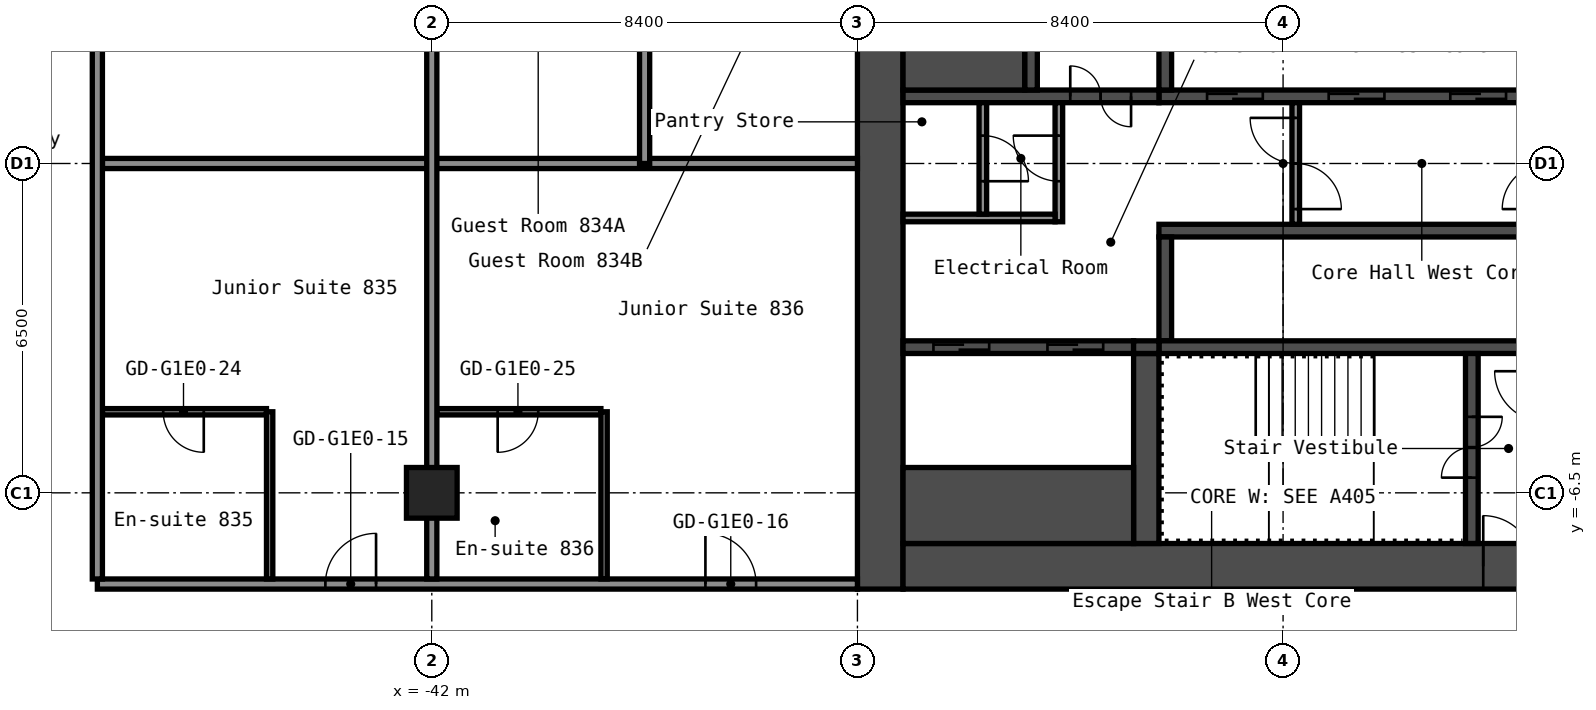
"""IFC4 building model, lengths in metres.
Left out: names, types, materials, properties, quantities, classifications, styles, units other than length and angle.
Written with IfcOpenShell. Run it as: python <this file> out.ifc"""

import sys

from ifc_helpers import new_model, si_unit, direction, frame, frame_2d, origin, origin_2d, place, context, subcontext, project, spatial, rectangle, hollow_rectangle, extrude, element, fill, save


model = new_model("IFC4")
c1 = context("Model", 3, precision=1e-05, world=origin(), true_north=direction((0.0, 1.0)))
c2 = subcontext(c1, "Body", "Model", "MODEL_VIEW")
j1 = project(units=[si_unit("LENGTHUNIT", "METRE"), si_unit("PLANEANGLEUNIT", "RADIAN")], contexts=[c1])
p1 = place(None, origin())
s1 = spatial("IfcSite", under=j1, at=p1, CompositionType="ELEMENT")
p2 = place(p1, origin())
s2 = spatial("IfcBuilding", under=s1, at=p2, CompositionType="ELEMENT")
p3 = place(p2, frame((0.0, 0.0, 32.6)))
s3 = spatial("IfcBuildingStorey", under=s2, at=p3, CompositionType="ELEMENT", Elevation=32.6)
p4 = place(p3, frame((-42.0, -6.5, 0.0), z_axis=(0.0, 0.0, 1.0), x_axis=(1.0, 0.0, 0.0)))
e1 = element("IfcColumn", 1, at=p4, inside=s3, PredefinedType="COLUMN", context=c2, shape_type="SweptSolid", body=[
    extrude(hollow_rectangle(XDim=1.0, YDim=1.0, WallThickness=0.04, at=origin_2d()), origin(), (0.0, 0.0, 1.0), 2.8),
])
p5 = place(p3, frame((-33.15, -8.4, 0.0), z_axis=(0.0, 0.0, 1.0), x_axis=(0.0, 1.0, 0.0)))
e2 = element("IfcWall", 2, at=p5, inside=s3, PredefinedType="SHEAR", context=c2, shape_type="SweptSolid", body=[
    extrude(rectangle(XDim=16.8, YDim=0.9, at=frame_2d((8.4, 0.0))), origin(), (0.0, 0.0, 1.0), 2.8),
])
p6 = place(p3, frame((-32.7, -7.95, 0.0), z_axis=(0.0, 0.0, 1.0), x_axis=(1.0, 0.0, 0.0)))
e3 = element("IfcWall", 3, at=p6, inside=s3, PredefinedType="SHEAR", context=c2, shape_type="SweptSolid", body=[
    extrude(rectangle(XDim=15.0, YDim=0.9, at=frame_2d((7.5, 0.0))), origin(), (0.0, 0.0, 1.0), 2.8),
])
p7 = place(p6, frame((11.45, 0.0, 0.0)))
e4 = element("IfcOpeningElement", 4, at=p7, cuts=e3, PredefinedType="OPENING", context=c2, shape_type="SweptSolid", body=[
    extrude(rectangle(XDim=1.0, YDim=2.1, at=frame_2d((0.5, 1.05))), frame((0.0, 0.46, 0.0), z_axis=(0.0, -1.0, 0.0), x_axis=(1.0, 0.0, 0.0)), (0.0, 0.0, 1.0), 0.92),
])
p8 = place(p3, frame((-27.65, 1.325, 0.0), z_axis=(0.0, 0.0, 1.0), x_axis=(1.0, 0.0, 0.0)))
e5 = element("IfcWall", 5, at=p8, inside=s3, PredefinedType="SHEAR", context=c2, shape_type="SweptSolid", body=[
    extrude(rectangle(XDim=7.5, YDim=0.25, at=frame_2d((3.75, 0.0))), origin(), (0.0, 0.0, 1.0), 2.8),
])
p9 = place(p8, frame((5.75, 0.0, 0.0)))
e6 = element("IfcOpeningElement", 6, at=p9, cuts=e5, PredefinedType="OPENING", context=c2, shape_type="SweptSolid", body=[
    extrude(rectangle(XDim=1.1, YDim=2.1, at=frame_2d((0.55, 1.05))), frame((0.0, 0.135, 0.0), z_axis=(0.0, -1.0, 0.0), x_axis=(1.0, 0.0, 0.0)), (0.0, 0.0, 1.0), 0.27),
])
p10 = place(p8, frame((3.35, 0.0, 0.0)))
e7 = element("IfcOpeningElement", 7, at=p10, cuts=e5, PredefinedType="OPENING", context=c2, shape_type="SweptSolid", body=[
    extrude(rectangle(XDim=1.1, YDim=2.1, at=frame_2d((0.55, 1.05))), frame((0.0, 0.135, 0.0), z_axis=(0.0, -1.0, 0.0), x_axis=(1.0, 0.0, 0.0)), (0.0, 0.0, 1.0), 0.27),
])
p11 = place(p8, frame((0.95, 0.0, 0.0)))
e8 = element("IfcOpeningElement", 8, at=p11, cuts=e5, PredefinedType="OPENING", context=c2, shape_type="SweptSolid", body=[
    extrude(rectangle(XDim=1.1, YDim=2.1, at=frame_2d((0.55, 1.05))), frame((0.0, 0.135, 0.0), z_axis=(0.0, -1.0, 0.0), x_axis=(1.0, 0.0, 0.0)), (0.0, 0.0, 1.0), 0.27),
])
p12 = place(p3, frame((-27.525, 1.45, 0.0), z_axis=(0.0, 0.0, 1.0), x_axis=(0.0, 1.0, 0.0)))
e9 = element("IfcWall", 9, at=p12, inside=s3, PredefinedType="SHEAR", context=c2, shape_type="SweptSolid", body=[
    extrude(rectangle(XDim=2.05, YDim=0.25, at=frame_2d((1.025, 0.0))), origin(), (0.0, 0.0, 1.0), 2.8),
])
p13 = place(p3, frame((-32.7, 1.325, 0.0), z_axis=(0.0, 0.0, 1.0), x_axis=(1.0, 0.0, 0.0)))
e10 = element("IfcWall", 10, at=p13, inside=s3, PredefinedType="SHEAR", context=c2, shape_type="SweptSolid", body=[
    extrude(rectangle(XDim=5.05, YDim=0.25, at=frame_2d((2.525, 0.0))), origin(), (0.0, 0.0, 1.0), 2.8),
])
p14 = place(p13, frame((3.3, 0.0, 0.0)))
e11 = element("IfcOpeningElement", 11, at=p14, cuts=e10, PredefinedType="OPENING", context=c2, shape_type="SweptSolid", body=[
    extrude(rectangle(XDim=1.2, YDim=2.1, at=frame_2d((0.6, 1.05))), frame((0.0, 0.135, 0.0), z_axis=(0.0, -1.0, 0.0), x_axis=(1.0, 0.0, 0.0)), (0.0, 0.0, 1.0), 0.27),
])
p15 = place(p3, frame((-30.175, 1.45, 0.0), z_axis=(0.0, 0.0, 1.0), x_axis=(0.0, 1.0, 0.0)))
e12 = element("IfcWall", 12, at=p15, inside=s3, PredefinedType="SHEAR", context=c2, shape_type="SweptSolid", body=[
    extrude(rectangle(XDim=6.05, YDim=0.25, at=frame_2d((3.025, 0.0))), origin(), (0.0, 0.0, 1.0), 2.8),
])
p16 = place(p15, frame((2.625, 0.0, 0.0)))
e13 = element("IfcOpeningElement", 13, at=p16, cuts=e12, PredefinedType="OPENING", context=c2, shape_type="SweptSolid", body=[
    extrude(rectangle(XDim=1.1, YDim=2.1, at=frame_2d((0.55, 1.05))), frame((0.0, 0.135, 0.0), z_axis=(0.0, -1.0, 0.0), x_axis=(1.0, 0.0, 0.0)), (0.0, 0.0, 1.0), 0.27),
])
p17 = place(p3, frame((-32.7, 2.375, 0.0), z_axis=(0.0, 0.0, 1.0), x_axis=(1.0, 0.0, 0.0)))
e14 = element("IfcWall", 14, at=p17, inside=s3, PredefinedType="SHEAR", context=c2, shape_type="SweptSolid", body=[
    extrude(rectangle(XDim=2.4, YDim=1.85, at=frame_2d((1.2, 0.0))), origin(), (0.0, 0.0, 1.0), 2.8),
])
p18 = place(p3, frame((-27.65, -1.325, 0.0), z_axis=(0.0, 0.0, 1.0), x_axis=(1.0, 0.0, 0.0)))
e15 = element("IfcWall", 15, at=p18, inside=s3, PredefinedType="SHEAR", context=c2, shape_type="SweptSolid", body=[
    extrude(rectangle(XDim=7.5, YDim=0.25, at=frame_2d((3.75, 0.0))), origin(), (0.0, 0.0, 1.0), 2.8),
])
p19 = place(p3, frame((-27.525, -3.5, 0.0), z_axis=(0.0, 0.0, 1.0), x_axis=(0.0, 1.0, 0.0)))
e16 = element("IfcWall", 16, at=p19, inside=s3, PredefinedType="SHEAR", context=c2, shape_type="SweptSolid", body=[
    extrude(rectangle(XDim=2.05, YDim=0.25, at=frame_2d((1.025, 0.0))), origin(), (0.0, 0.0, 1.0), 2.8),
])
p20 = place(p3, frame((-27.65, -3.625, 0.0), z_axis=(0.0, 0.0, 1.0), x_axis=(1.0, 0.0, 0.0)))
e17 = element("IfcWall", 17, at=p20, inside=s3, PredefinedType="SHEAR", context=c2, shape_type="SweptSolid", body=[
    extrude(rectangle(XDim=7.5, YDim=0.25, at=frame_2d((3.75, 0.0))), origin(), (0.0, 0.0, 1.0), 2.8),
])
p21 = place(p3, frame((-21.475, -7.5, 0.0), z_axis=(0.0, 0.0, 1.0), x_axis=(0.0, 1.0, 0.0)))
e18 = element("IfcWall", 18, at=p21, inside=s3, PredefinedType="SHEAR", context=c2, shape_type="SweptSolid", body=[
    extrude(rectangle(XDim=3.75, YDim=0.25, at=frame_2d((1.875, 0.0))), origin(), (0.0, 0.0, 1.0), 2.8),
])
p22 = place(p21, frame((1.3, 0.0, 0.0)))
e19 = element("IfcOpeningElement", 19, at=p22, cuts=e18, PredefinedType="OPENING", context=c2, shape_type="SweptSolid", body=[
    extrude(rectangle(XDim=1.2, YDim=2.1, at=frame_2d((0.6, 1.05))), frame((0.0, 0.135, 0.0), z_axis=(0.0, -1.0, 0.0), x_axis=(1.0, 0.0, 0.0)), (0.0, 0.0, 1.0), 0.27),
])
p23 = place(p3, frame((-27.9, -7.5, 0.0), z_axis=(0.0, 0.0, 1.0), x_axis=(0.0, 1.0, 0.0)))
e20 = element("IfcWall", 20, at=p23, inside=s3, PredefinedType="SHEAR", context=c2, shape_type="SweptSolid", body=[
    extrude(rectangle(XDim=3.75, YDim=0.5, at=frame_2d((1.875, 0.0))), origin(), (0.0, 0.0, 1.0), 2.8),
])
p24 = place(p3, frame((-32.7, -3.625, 0.0), z_axis=(0.0, 0.0, 1.0), x_axis=(1.0, 0.0, 0.0)))
e21 = element("IfcWall", 21, at=p24, inside=s3, PredefinedType="SHEAR", context=c2, shape_type="SweptSolid", body=[
    extrude(rectangle(XDim=4.55, YDim=0.25, at=frame_2d((2.275, 0.0))), origin(), (0.0, 0.0, 1.0), 2.8),
])
p25 = place(p24, frame((2.85, 0.0, 0.0)))
e22 = element("IfcOpeningElement", 22, at=p25, cuts=e21, PredefinedType="OPENING", context=c2, shape_type="SweptSolid", body=[
    extrude(rectangle(XDim=1.1, YDim=2.1, at=frame_2d((0.55, 1.05))), frame((0.0, 0.135, 0.0), z_axis=(0.0, -1.0, 0.0), x_axis=(1.0, 0.0, 0.0)), (0.0, 0.0, 1.0), 0.27),
])
p26 = place(p24, frame((0.6, 0.0, 0.0)))
e23 = element("IfcOpeningElement", 23, at=p26, cuts=e21, PredefinedType="OPENING", context=c2, shape_type="SweptSolid", body=[
    extrude(rectangle(XDim=1.1, YDim=2.1, at=frame_2d((0.55, 1.05))), frame((0.0, 0.135, 0.0), z_axis=(0.0, -1.0, 0.0), x_axis=(1.0, 0.0, 0.0)), (0.0, 0.0, 1.0), 0.27),
])
p27 = place(p3, frame((-32.7, -6.75, 0.0), z_axis=(0.0, 0.0, 1.0), x_axis=(1.0, 0.0, 0.0)))
e24 = element("IfcWall", 24, at=p27, inside=s3, PredefinedType="SHEAR", context=c2, shape_type="SweptSolid", body=[
    extrude(rectangle(XDim=4.55, YDim=1.5, at=frame_2d((2.275, 0.0))), origin(), (0.0, 0.0, 1.0), 2.8),
])
p28 = place(p3, frame((-28.15, -3.625, 0.0), z_axis=(0.0, 0.0, 1.0), x_axis=(1.0, 0.0, 0.0)))
e25 = element("IfcWall", 25, at=p28, inside=s3, PredefinedType="SHEAR", context=c2, shape_type="SweptSolid", body=[
    extrude(rectangle(XDim=0.5, YDim=0.25, at=frame_2d((0.25, 0.0))), origin(), (0.0, 0.0, 1.0), 2.8),
])
p29 = place(p3, frame((-24.95, -1.2, 0.0), z_axis=(0.0, 0.0, 1.0), x_axis=(0.0, 1.0, 0.0)))
e26 = element("IfcWall", 26, at=p29, inside=s3, PredefinedType="PARTITIONING", context=c2, shape_type="SweptSolid", body=[
    extrude(rectangle(XDim=2.4, YDim=0.15, at=frame_2d((1.2, 0.0))), origin(), (0.0, 0.0, 1.0), 2.8),
])
p30 = place(p29, frame((0.3, 0.0, 0.0)))
e27 = element("IfcOpeningElement", 27, at=p30, cuts=e26, PredefinedType="OPENING", context=c2, shape_type="SweptSolid", body=[
    extrude(rectangle(XDim=1.8, YDim=2.1, at=frame_2d((0.9, 1.05))), frame((0.0, 0.085, 0.0), z_axis=(0.0, -1.0, 0.0), x_axis=(1.0, 0.0, 0.0)), (0.0, 0.0, 1.0), 0.17),
])
p31 = place(p3, frame((-29.625, -1.15, 0.0), z_axis=(0.0, 0.0, 1.0), x_axis=(0.0, 1.0, 0.0)))
e28 = element("IfcWall", 28, at=p31, inside=s3, PredefinedType="PARTITIONING", context=c2, shape_type="SweptSolid", body=[
    extrude(rectangle(XDim=2.35, YDim=0.15, at=frame_2d((1.175, 0.0))), origin(), (0.0, 0.0, 1.0), 2.8),
])
p32 = place(p31, frame((0.8, 0.0, 0.0)))
e29 = element("IfcOpeningElement", 29, at=p32, cuts=e28, PredefinedType="OPENING", context=c2, shape_type="SweptSolid", body=[
    extrude(rectangle(XDim=0.9, YDim=2.1, at=frame_2d((0.45, 1.05))), frame((0.0, 0.085, 0.0), z_axis=(0.0, -1.0, 0.0), x_axis=(1.0, 0.0, 0.0)), (0.0, 0.0, 1.0), 0.17),
])
p33 = place(p3, frame((-32.7, -1.075, 0.0), z_axis=(0.0, 0.0, 1.0), x_axis=(1.0, 0.0, 0.0)))
e30 = element("IfcWall", 30, at=p33, inside=s3, PredefinedType="PARTITIONING", context=c2, shape_type="SweptSolid", body=[
    extrude(rectangle(XDim=3.0, YDim=0.15, at=frame_2d((1.5, 0.0))), origin(), (0.0, 0.0, 1.0), 2.8),
])
p34 = place(p3, frame((-31.125, -1.0, 0.0), z_axis=(0.0, 0.0, 1.0), x_axis=(0.0, 1.0, 0.0)))
e31 = element("IfcWall", 31, at=p34, inside=s3, PredefinedType="PARTITIONING", context=c2, shape_type="SweptSolid", body=[
    extrude(rectangle(XDim=2.2, YDim=0.15, at=frame_2d((1.1, 0.0))), origin(), (0.0, 0.0, 1.0), 2.8),
])
p35 = place(p34, frame((0.65, 0.0, 0.0)))
e32 = element("IfcOpeningElement", 32, at=p35, cuts=e31, PredefinedType="OPENING", context=c2, shape_type="SweptSolid", body=[
    extrude(rectangle(XDim=0.9, YDim=2.1, at=frame_2d((0.45, 1.05))), frame((0.0, 0.085, 0.0), z_axis=(0.0, -1.0, 0.0), x_axis=(1.0, 0.0, 0.0)), (0.0, 0.0, 1.0), 0.17),
])
p36 = place(p3, frame((-48.6, -8.3, 0.0), z_axis=(0.0, 0.0, 1.0), x_axis=(1.0, 0.0, 0.0)))
e33 = element("IfcWall", 33, at=p36, inside=s3, PredefinedType="PARTITIONING", context=c2, shape_type="SweptSolid", body=[
    extrude(rectangle(XDim=15.0, YDim=0.2, at=frame_2d((7.5, 0.0))), origin(), (0.0, 0.0, 1.0), 2.8),
])
p37 = place(p36, frame((4.5, 0.0, 0.0)))
e34 = element("IfcOpeningElement", 34, at=p37, cuts=e33, PredefinedType="OPENING", context=c2, shape_type="SweptSolid", body=[
    extrude(rectangle(XDim=1.0, YDim=2.1, at=frame_2d((0.5, 1.05))), frame((0.0, 0.11, 0.0), z_axis=(0.0, -1.0, 0.0), x_axis=(1.0, 0.0, 0.0)), (0.0, 0.0, 1.0), 0.22),
])
p38 = place(p36, frame((12.0, 0.0, 0.0)))
e35 = element("IfcOpeningElement", 35, at=p38, cuts=e33, PredefinedType="OPENING", context=c2, shape_type="SweptSolid", body=[
    extrude(rectangle(XDim=1.0, YDim=2.1, at=frame_2d((0.5, 1.05))), frame((0.0, 0.11, 0.0), z_axis=(0.0, -1.0, 0.0), x_axis=(1.0, 0.0, 0.0)), (0.0, 0.0, 1.0), 0.22),
])
p39 = place(p3, frame((-48.5, -4.9, 0.0), z_axis=(0.0, 0.0, 1.0), x_axis=(1.0, 0.0, 0.0)))
e36 = element("IfcWall", 36, at=p39, inside=s3, PredefinedType="PARTITIONING", context=c2, shape_type="SweptSolid", body=[
    extrude(rectangle(XDim=3.238, YDim=0.125, at=frame_2d((1.619, 0.0))), origin(), (0.0, 0.0, 1.0), 2.8),
])
p40 = place(p39, frame((1.2, 0.0, 0.0)))
e37 = element("IfcOpeningElement", 37, at=p40, cuts=e36, PredefinedType="OPENING", context=c2, shape_type="SweptSolid", body=[
    extrude(rectangle(XDim=0.8, YDim=2.1, at=frame_2d((0.4, 1.05))), frame((0.0, 0.073, 0.0), z_axis=(0.0, -1.0, 0.0), x_axis=(1.0, 0.0, 0.0)), (0.0, 0.0, 1.0), 0.145),
])
p41 = place(p3, frame((-41.9, -4.9, 0.0), z_axis=(0.0, 0.0, 1.0), x_axis=(1.0, 0.0, 0.0)))
e38 = element("IfcWall", 38, at=p41, inside=s3, PredefinedType="PARTITIONING", context=c2, shape_type="SweptSolid", body=[
    extrude(rectangle(XDim=3.237, YDim=0.125, at=frame_2d((1.619, 0.0))), origin(), (0.0, 0.0, 1.0), 2.8),
])
p42 = place(p41, frame((1.2, 0.0, 0.0)))
e39 = element("IfcOpeningElement", 39, at=p42, cuts=e38, PredefinedType="OPENING", context=c2, shape_type="SweptSolid", body=[
    extrude(rectangle(XDim=0.8, YDim=2.1, at=frame_2d((0.4, 1.05))), frame((0.0, 0.073, 0.0), z_axis=(0.0, -1.0, 0.0), x_axis=(1.0, 0.0, 0.0)), (0.0, 0.0, 1.0), 0.145),
])
p43 = place(p3, frame((-48.5, 0.0, 0.0), z_axis=(0.0, 0.0, 1.0), x_axis=(1.0, 0.0, 0.0)))
e40 = element("IfcWall", 40, at=p43, inside=s3, PredefinedType="PARTITIONING", context=c2, shape_type="SweptSolid", body=[
    extrude(rectangle(XDim=14.9, YDim=0.2, at=frame_2d((7.45, 0.0))), origin(), (0.0, 0.0, 1.0), 2.8),
])
p44 = place(p3, frame((-48.6, -8.2, 0.0), z_axis=(0.0, 0.0, 1.0), x_axis=(0.0, 1.0, 0.0)))
e41 = element("IfcWall", 41, at=p44, inside=s3, PredefinedType="PARTITIONING", context=c2, shape_type="SweptSolid", body=[
    extrude(rectangle(XDim=16.4, YDim=0.2, at=frame_2d((8.2, 0.0))), origin(), (0.0, 0.0, 1.0), 2.8),
])
p45 = place(p3, frame((-45.2, -8.2, 0.0), z_axis=(0.0, 0.0, 1.0), x_axis=(0.0, 1.0, 0.0)))
e42 = element("IfcWall", 42, at=p45, inside=s3, PredefinedType="PARTITIONING", context=c2, shape_type="SweptSolid", body=[
    extrude(rectangle(XDim=3.3, YDim=0.125, at=frame_2d((1.65, 0.0))), origin(), (0.0, 0.0, 1.0), 2.8),
])
p46 = place(p3, frame((-42.0, -8.2, 0.0), z_axis=(0.0, 0.0, 1.0), x_axis=(0.0, 1.0, 0.0)))
e43 = element("IfcWall", 43, at=p46, inside=s3, PredefinedType="PARTITIONING", context=c2, shape_type="SweptSolid", body=[
    extrude(rectangle(XDim=16.4, YDim=0.2, at=frame_2d((8.2, 0.0))), origin(), (0.0, 0.0, 1.0), 2.8),
])
p47 = place(p3, frame((-38.6, -8.2, 0.0), z_axis=(0.0, 0.0, 1.0), x_axis=(0.0, 1.0, 0.0)))
e44 = element("IfcWall", 44, at=p47, inside=s3, PredefinedType="PARTITIONING", context=c2, shape_type="SweptSolid", body=[
    extrude(rectangle(XDim=3.3, YDim=0.125, at=frame_2d((1.65, 0.0))), origin(), (0.0, 0.0, 1.0), 2.8),
])
p48 = place(p3, frame((-37.8, 0.0, 0.0), z_axis=(0.0, 0.0, 1.0), x_axis=(0.0, 1.0, 0.0)))
e45 = element("IfcWall", 45, at=p48, inside=s3, PredefinedType="PARTITIONING", context=c2, shape_type="SweptSolid", body=[
    extrude(rectangle(XDim=8.2, YDim=0.2, at=frame_2d((4.1, 0.0))), origin(), (0.0, 0.0, 1.0), 2.8),
])
p49 = place(p7, origin())
e46 = element("IfcDoor", 46, at=p49, inside=s3, OperationType="SINGLE_SWING_RIGHT", PredefinedType="DOOR", context=c2, shape_type="SweptSolid", body=[
    extrude(rectangle(XDim=1.0, YDim=2.1, at=frame_2d((0.5, 1.05))), frame((0.0, 0.025, 0.0), z_axis=(0.0, -1.0, 0.0), x_axis=(1.0, 0.0, 0.0)), (0.0, 0.0, 1.0), 0.05),
])
fill(e4, e46)
p50 = place(p22, origin())
e47 = element("IfcDoor", 47, at=p50, inside=s3, OperationType="DOUBLE_DOOR_SINGLE_SWING", PredefinedType="DOOR", context=c2, shape_type="SweptSolid", body=[
    extrude(rectangle(XDim=1.2, YDim=2.1, at=frame_2d((0.6, 1.05))), frame((0.0, 0.025, 0.0), z_axis=(0.0, -1.0, 0.0), x_axis=(1.0, 0.0, 0.0)), (0.0, 0.0, 1.0), 0.05),
])
fill(e19, e47)
p51 = place(p14, origin())
e48 = element("IfcDoor", 48, at=p51, inside=s3, OperationType="DOUBLE_DOOR_SINGLE_SWING", PredefinedType="DOOR", context=c2, shape_type="SweptSolid", body=[
    extrude(rectangle(XDim=1.2, YDim=2.1, at=frame_2d((0.6, 1.05))), frame((0.0, 0.025, 0.0), z_axis=(0.0, -1.0, 0.0), x_axis=(1.0, 0.0, 0.0)), (0.0, 0.0, 1.0), 0.05),
])
fill(e11, e48)
p52 = place(p30, origin())
e49 = element("IfcDoor", 49, at=p52, inside=s3, OperationType="DOUBLE_DOOR_SINGLE_SWING", PredefinedType="DOOR", context=c2, shape_type="SweptSolid", body=[
    extrude(rectangle(XDim=1.8, YDim=2.1, at=frame_2d((0.9, 1.05))), frame((0.0, 0.025, 0.0), z_axis=(0.0, -1.0, 0.0), x_axis=(1.0, 0.0, 0.0)), (0.0, 0.0, 1.0), 0.05),
])
fill(e27, e49)
p53 = place(p32, origin())
e50 = element("IfcDoor", 50, at=p53, inside=s3, OperationType="SINGLE_SWING_LEFT", PredefinedType="DOOR", context=c2, shape_type="SweptSolid", body=[
    extrude(rectangle(XDim=0.9, YDim=2.1, at=frame_2d((0.45, 1.05))), frame((0.0, 0.025, 0.0), z_axis=(0.0, -1.0, 0.0), x_axis=(1.0, 0.0, 0.0)), (0.0, 0.0, 1.0), 0.05),
])
fill(e29, e50)
p54 = place(p35, origin())
e51 = element("IfcDoor", 51, at=p54, inside=s3, OperationType="SINGLE_SWING_LEFT", PredefinedType="DOOR", context=c2, shape_type="SweptSolid", body=[
    extrude(rectangle(XDim=0.9, YDim=2.1, at=frame_2d((0.45, 1.05))), frame((0.0, 0.025, 0.0), z_axis=(0.0, -1.0, 0.0), x_axis=(1.0, 0.0, 0.0)), (0.0, 0.0, 1.0), 0.05),
])
fill(e32, e51)
p55 = place(p9, origin())
e52 = element("IfcDoor", 52, at=p55, inside=s3, OperationType="DOUBLE_DOOR_SLIDING", PredefinedType="DOOR", context=c2, shape_type="SweptSolid", body=[
    extrude(rectangle(XDim=1.1, YDim=2.1, at=frame_2d((0.55, 1.05))), frame((0.0, 0.025, 0.0), z_axis=(0.0, -1.0, 0.0), x_axis=(1.0, 0.0, 0.0)), (0.0, 0.0, 1.0), 0.05),
])
fill(e6, e52)
p56 = place(p10, origin())
e53 = element("IfcDoor", 53, at=p56, inside=s3, OperationType="DOUBLE_DOOR_SLIDING", PredefinedType="DOOR", context=c2, shape_type="SweptSolid", body=[
    extrude(rectangle(XDim=1.1, YDim=2.1, at=frame_2d((0.55, 1.05))), frame((0.0, 0.025, 0.0), z_axis=(0.0, -1.0, 0.0), x_axis=(1.0, 0.0, 0.0)), (0.0, 0.0, 1.0), 0.05),
])
fill(e7, e53)
p57 = place(p11, origin())
e54 = element("IfcDoor", 54, at=p57, inside=s3, OperationType="DOUBLE_DOOR_SLIDING", PredefinedType="DOOR", context=c2, shape_type="SweptSolid", body=[
    extrude(rectangle(XDim=1.1, YDim=2.1, at=frame_2d((0.55, 1.05))), frame((0.0, 0.025, 0.0), z_axis=(0.0, -1.0, 0.0), x_axis=(1.0, 0.0, 0.0)), (0.0, 0.0, 1.0), 0.05),
])
fill(e8, e54)
p58 = place(p25, origin())
e55 = element("IfcDoor", 55, at=p58, inside=s3, OperationType="DOUBLE_DOOR_SLIDING", PredefinedType="DOOR", context=c2, shape_type="SweptSolid", body=[
    extrude(rectangle(XDim=1.1, YDim=2.1, at=frame_2d((0.55, 1.05))), frame((0.0, 0.025, 0.0), z_axis=(0.0, -1.0, 0.0), x_axis=(1.0, 0.0, 0.0)), (0.0, 0.0, 1.0), 0.05),
])
fill(e22, e55)
p59 = place(p26, origin())
e56 = element("IfcDoor", 56, at=p59, inside=s3, OperationType="DOUBLE_DOOR_SLIDING", PredefinedType="DOOR", context=c2, shape_type="SweptSolid", body=[
    extrude(rectangle(XDim=1.1, YDim=2.1, at=frame_2d((0.55, 1.05))), frame((0.0, 0.025, 0.0), z_axis=(0.0, -1.0, 0.0), x_axis=(1.0, 0.0, 0.0)), (0.0, 0.0, 1.0), 0.05),
])
fill(e23, e56)
p60 = place(p37, origin())
e57 = element("IfcDoor", 57, at=p60, inside=s3, OperationType="SINGLE_SWING_LEFT", PredefinedType="DOOR", context=c2, shape_type="SweptSolid", body=[
    extrude(rectangle(XDim=1.0, YDim=2.1, at=frame_2d((0.5, 1.05))), frame((0.0, 0.025, 0.0), z_axis=(0.0, -1.0, 0.0), x_axis=(1.0, 0.0, 0.0)), (0.0, 0.0, 1.0), 0.05),
])
fill(e34, e57)
p61 = place(p38, origin())
e58 = element("IfcDoor", 58, at=p61, inside=s3, OperationType="SINGLE_SWING_RIGHT", PredefinedType="DOOR", context=c2, shape_type="SweptSolid", body=[
    extrude(rectangle(XDim=1.0, YDim=2.1, at=frame_2d((0.5, 1.05))), frame((0.0, 0.025, 0.0), z_axis=(0.0, -1.0, 0.0), x_axis=(1.0, 0.0, 0.0)), (0.0, 0.0, 1.0), 0.05),
])
fill(e35, e58)
p62 = place(p40, origin())
e59 = element("IfcDoor", 59, at=p62, inside=s3, OperationType="SINGLE_SWING_RIGHT", PredefinedType="DOOR", context=c2, shape_type="SweptSolid", body=[
    extrude(rectangle(XDim=0.8, YDim=2.1, at=frame_2d((0.4, 1.05))), frame((0.0, 0.025, 0.0), z_axis=(0.0, -1.0, 0.0), x_axis=(1.0, 0.0, 0.0)), (0.0, 0.0, 1.0), 0.05),
])
fill(e37, e59)
p63 = place(p42, origin())
e60 = element("IfcDoor", 60, at=p63, inside=s3, OperationType="SINGLE_SWING_LEFT", PredefinedType="DOOR", context=c2, shape_type="SweptSolid", body=[
    extrude(rectangle(XDim=0.8, YDim=2.1, at=frame_2d((0.4, 1.05))), frame((0.0, 0.025, 0.0), z_axis=(0.0, -1.0, 0.0), x_axis=(1.0, 0.0, 0.0)), (0.0, 0.0, 1.0), 0.05),
])
fill(e39, e60)
save(model, sys.argv[1])
